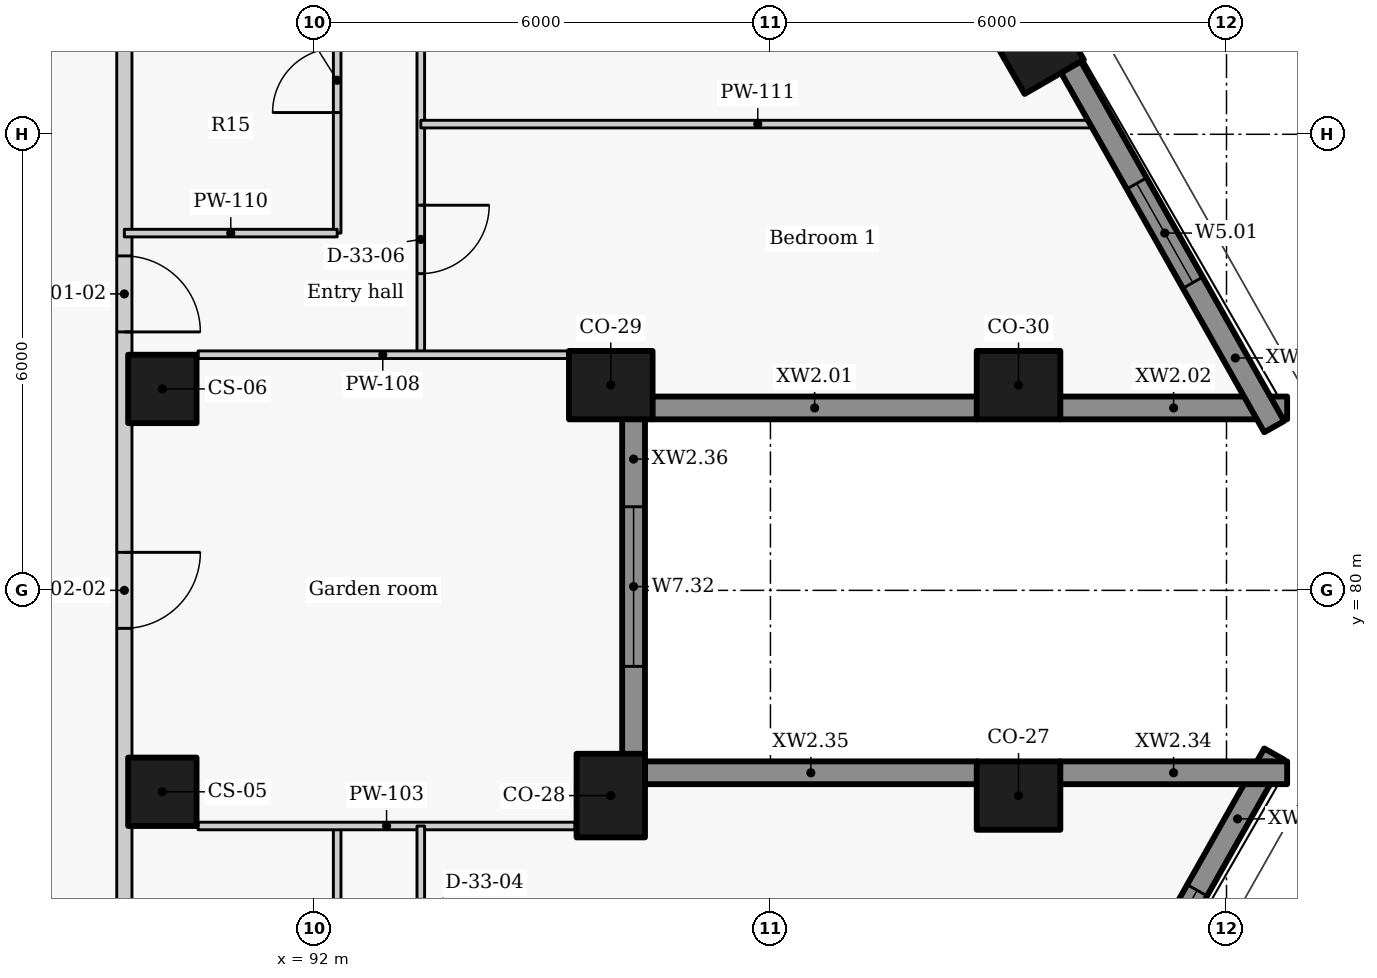
"""IFC4 building model, lengths in metres.
Left out: names, types, materials, properties, quantities, classifications, styles, units other than length and angle.
Written with IfcOpenShell. Run it as: python <this file> out.ifc"""

import sys

from ifc_helpers import new_model, si_unit, direction, frame, frame_2d, origin, origin_2d, place, context, subcontext, project, spatial, rectangle, extrude, element, fill, save


model = new_model("IFC4")
c1 = context("Model", 3, precision=1e-05, world=origin(), true_north=direction((0.0, 1.0)))
c2 = subcontext(c1, "Body", "Model", "MODEL_VIEW")
j1 = project(units=[si_unit("LENGTHUNIT", "METRE"), si_unit("PLANEANGLEUNIT", "RADIAN")], contexts=[c1])
p1 = place(None, origin())
s1 = spatial("IfcSite", under=j1, at=p1, CompositionType="ELEMENT")
p2 = place(p1, origin())
s2 = spatial("IfcBuilding", under=s1, at=p2, CompositionType="ELEMENT")
p3 = place(p2, frame((0.0, 0.0, 226.2)))
s3 = spatial("IfcBuildingStorey", under=s2, at=p3, CompositionType="ELEMENT", Elevation=226.2)
for number, where, z_axis, x_axis in (
    (1, (101.264, 77.3, 0.0), (0.0, 0.0, 1.0), (-1.0, 0.0, 0.0)),
    (2, (95.899, 77.3, 0.0), (0.0, 0.0, 1.0), (0.0, 1.0, 0.0)),
    (3, (95.899, 82.7, 0.0), (0.0, 0.0, 1.0), (1.0, 0.0, 0.0)),
    (4, (101.264, 82.7, 0.0), (0.0, 0.0, 1.0), (1.0, 0.0, 0.0)),
    (5, (101.459, 87.232, 0.0), (0.0, 0.0, 1.0), (-0.5, 0.866, 0.0)),
):
    element("IfcColumn", number, at=place(p3, frame(where, z_axis=z_axis, x_axis=x_axis)), inside=s3, PredefinedType="COLUMN", context=c2, shape_type="SweptSolid", body=[
        extrude(rectangle(XDim=1.1, YDim=0.9, at=origin_2d()), origin(), (0.0, 0.0, 1.0), 3.3),
    ])
for number, where, z_axis, x_axis in (
    (6, (90.0, 77.35, 0.0), (0.0, 0.0, 1.0), (0.0, 1.0, 0.0)),
    (7, (90.0, 82.65, 0.0), (0.0, 0.0, 1.0), (0.0, 1.0, 0.0)),
):
    element("IfcColumn", number, at=place(p3, frame(where, z_axis=z_axis, x_axis=x_axis)), inside=s3, PredefinedType="COLUMN", context=c2, shape_type="SweptSolid", body=[
        extrude(rectangle(XDim=0.9, YDim=0.9, at=origin_2d()), origin(), (0.0, 0.0, 1.0), 3.3),
    ])
p4 = place(p3, frame((96.446, 82.4, 0.0), z_axis=(0.0, 0.0, 1.0), x_axis=(1.0, 0.0, 0.0)))
e8 = element("IfcWall", 8, at=p4, inside=s3, PredefinedType="SOLIDWALL", context=c2, shape_type="SweptSolid", body=[
    extrude(rectangle(XDim=4.272, YDim=0.3, at=frame_2d((2.136, 0.0))), origin(), (0.0, 0.0, 1.0), 2.425),
])
p5 = place(p3, frame((101.81, 82.4, 0.0), z_axis=(0.0, 0.0, 1.0), x_axis=(1.0, 0.0, 0.0)))
e9 = element("IfcWall", 9, at=p5, inside=s3, PredefinedType="SOLIDWALL", context=c2, shape_type="SweptSolid", body=[
    extrude(rectangle(XDim=2.988, YDim=0.3, at=frame_2d((1.494, 0.0))), origin(), (0.0, 0.0, 1.0), 2.425),
])
p6 = place(p3, frame((104.627, 82.154, 0.0), z_axis=(0.0, 0.0, 1.0), x_axis=(-0.492080931903, 0.870549456641, 0.0)))
e10 = element("IfcWall", 10, at=p6, inside=s3, PredefinedType="SOLIDWALL", context=c2, shape_type="SweptSolid", body=[
    extrude(rectangle(XDim=5.437, YDim=0.3, at=frame_2d((2.718, 0.0))), origin(), (0.0, 0.0, 1.0), 2.425),
])
p7 = place(p6, frame((2.176, 0.0, 0.9)))
e11 = element("IfcOpeningElement", 11, at=p7, cuts=e10, PredefinedType="OPENING", context=c2, shape_type="SweptSolid", body=[
    extrude(rectangle(XDim=1.5, YDim=1.1, at=frame_2d((0.75, 0.55))), frame((0.0, 0.16, 0.0), z_axis=(0.0, -1.0, 0.0), x_axis=(1.0, 0.0, 0.0)), (0.0, 0.0, 1.0), 0.32),
])
p8 = place(p3, frame((101.952, 73.114, 0.0), z_axis=(0.0, 0.0, 1.0), x_axis=(0.492080931903, 0.870549456641, 0.0)))
e12 = element("IfcWall", 12, at=p8, inside=s3, PredefinedType="SOLIDWALL", context=c2, shape_type="SweptSolid", body=[
    extrude(rectangle(XDim=5.437, YDim=0.3, at=frame_2d((2.718, 0.0))), origin(), (0.0, 0.0, 1.0), 2.425),
])
p9 = place(p8, frame((1.878, 0.0, 0.9)))
e13 = element("IfcOpeningElement", 13, at=p9, cuts=e12, PredefinedType="OPENING", context=c2, shape_type="SweptSolid", body=[
    extrude(rectangle(XDim=1.5, YDim=1.1, at=frame_2d((0.75, 0.55))), frame((0.0, 0.16, 0.0), z_axis=(0.0, -1.0, 0.0), x_axis=(1.0, 0.0, 0.0)), (0.0, 0.0, 1.0), 0.32),
])
p10 = place(p3, frame((104.798, 77.6, 0.0), z_axis=(0.0, 0.0, 1.0), x_axis=(-1.0, 0.0, 0.0)))
e14 = element("IfcWall", 14, at=p10, inside=s3, PredefinedType="SOLIDWALL", context=c2, shape_type="SweptSolid", body=[
    extrude(rectangle(XDim=2.988, YDim=0.3, at=frame_2d((1.494, 0.0))), origin(), (0.0, 0.0, 1.0), 2.425),
])
p11 = place(p3, frame((100.718, 77.6, 0.0), z_axis=(0.0, 0.0, 1.0), x_axis=(-1.0, 0.0, 0.0)))
e15 = element("IfcWall", 15, at=p11, inside=s3, PredefinedType="SOLIDWALL", context=c2, shape_type="SweptSolid", body=[
    extrude(rectangle(XDim=4.373, YDim=0.3, at=frame_2d((2.186, 0.0))), origin(), (0.0, 0.0, 1.0), 2.425),
])
p12 = place(p3, frame((96.199, 77.846, 0.0), z_axis=(0.0, 0.0, 1.0), x_axis=(0.0, 1.0, 0.0)))
e16 = element("IfcWall", 16, at=p12, inside=s3, PredefinedType="SOLIDWALL", context=c2, shape_type="SweptSolid", body=[
    extrude(rectangle(XDim=4.408, YDim=0.3, at=frame_2d((2.204, 0.0))), origin(), (0.0, 0.0, 1.0), 2.425),
])
p13 = place(p12, frame((1.154, 0.0, 0.9)))
e17 = element("IfcOpeningElement", 17, at=p13, cuts=e16, PredefinedType="OPENING", context=c2, shape_type="SweptSolid", body=[
    extrude(rectangle(XDim=2.1, YDim=1.1, at=frame_2d((1.05, 0.55))), frame((0.0, 0.16, 0.0), z_axis=(0.0, -1.0, 0.0), x_axis=(1.0, 0.0, 0.0)), (0.0, 0.0, 1.0), 0.32),
])
p14 = place(p3, frame((89.5, 87.423, 0.0), z_axis=(0.0, 0.0, 1.0), x_axis=(0.0, -1.0, 0.0)))
e18 = element("IfcWall", 18, at=p14, inside=s3, PredefinedType="PARTITIONING", context=c2, shape_type="SweptSolid", body=[
    extrude(rectangle(XDim=15.786, YDim=0.2, at=frame_2d((7.893, 0.0))), origin(), (0.0, 0.0, 1.0), 3.025),
])
p15 = place(p14, frame((6.923, 0.0, 0.0)))
e19 = element("IfcOpeningElement", 19, at=p15, cuts=e18, PredefinedType="OPENING", context=c2, shape_type="SweptSolid", body=[
    extrude(rectangle(XDim=1.0, YDim=2.1, at=frame_2d((0.5, 1.05))), frame((0.0, 0.11, 0.0), z_axis=(0.0, -1.0, 0.0), x_axis=(1.0, 0.0, 0.0)), (0.0, 0.0, 1.0), 0.22),
])
p16 = place(p14, frame((3.023, 0.0, 0.0)))
e20 = element("IfcOpeningElement", 20, at=p16, cuts=e18, PredefinedType="OPENING", context=c2, shape_type="SweptSolid", body=[
    extrude(rectangle(XDim=1.0, YDim=2.1, at=frame_2d((0.5, 1.05))), frame((0.0, 0.11, 0.0), z_axis=(0.0, -1.0, 0.0), x_axis=(1.0, 0.0, 0.0)), (0.0, 0.0, 1.0), 0.22),
])
p17 = place(p3, frame((92.3, 69.75, 0.0), z_axis=(0.0, 0.0, 1.0), x_axis=(0.0, 1.0, 0.0)))
e21 = element("IfcWall", 21, at=p17, inside=s3, PredefinedType="PARTITIONING", context=c2, shape_type="SweptSolid", body=[
    extrude(rectangle(XDim=7.15, YDim=0.1, at=frame_2d((3.575, 0.0))), origin(), (0.0, 0.0, 1.0), 3.025),
])
p18 = place(p17, frame((1.2, 0.0, 0.0)))
e22 = element("IfcOpeningElement", 22, at=p18, cuts=e21, PredefinedType="OPENING", context=c2, shape_type="SweptSolid", body=[
    extrude(rectangle(XDim=0.85, YDim=2.1, at=frame_2d((0.425, 1.05))), frame((0.0, 0.06, 0.0), z_axis=(0.0, -1.0, 0.0), x_axis=(1.0, 0.0, 0.0)), (0.0, 0.0, 1.0), 0.12),
])
p19 = place(p17, frame((4.75, 0.0, 0.0)))
e23 = element("IfcOpeningElement", 23, at=p19, cuts=e21, PredefinedType="OPENING", context=c2, shape_type="SweptSolid", body=[
    extrude(rectangle(XDim=0.9, YDim=2.1, at=frame_2d((0.45, 1.05))), frame((0.0, 0.06, 0.0), z_axis=(0.0, -1.0, 0.0), x_axis=(1.0, 0.0, 0.0)), (0.0, 0.0, 1.0), 0.12),
])
p20 = place(p3, frame((92.3, 84.7, 0.0), z_axis=(0.0, 0.0, 1.0), x_axis=(0.0, 1.0, 0.0)))
e24 = element("IfcWall", 24, at=p20, inside=s3, PredefinedType="PARTITIONING", context=c2, shape_type="SweptSolid", body=[
    extrude(rectangle(XDim=8.85, YDim=0.1, at=frame_2d((4.425, 0.0))), origin(), (0.0, 0.0, 1.0), 3.025),
])
p21 = place(p20, frame((1.586, 0.0, 0.0)))
e25 = element("IfcOpeningElement", 25, at=p21, cuts=e24, PredefinedType="OPENING", context=c2, shape_type="SweptSolid", body=[
    extrude(rectangle(XDim=0.85, YDim=2.1, at=frame_2d((0.425, 1.05))), frame((0.0, 0.06, 0.0), z_axis=(0.0, -1.0, 0.0), x_axis=(1.0, 0.0, 0.0)), (0.0, 0.0, 1.0), 0.12),
])
p22 = place(p20, frame((5.986, 0.0, 0.0)))
e26 = element("IfcOpeningElement", 26, at=p22, cuts=e24, PredefinedType="OPENING", context=c2, shape_type="SweptSolid", body=[
    extrude(rectangle(XDim=0.9, YDim=2.1, at=frame_2d((0.45, 1.05))), frame((0.0, 0.06, 0.0), z_axis=(0.0, -1.0, 0.0), x_axis=(1.0, 0.0, 0.0)), (0.0, 0.0, 1.0), 0.12),
])
p23 = place(p3, frame((90.47, 76.9, 0.0), z_axis=(0.0, 0.0, 1.0), x_axis=(1.0, 0.0, 0.0)))
e27 = element("IfcWall", 27, at=p23, inside=s3, PredefinedType="PARTITIONING", context=c2, shape_type="SweptSolid", body=[
    extrude(rectangle(XDim=4.959, YDim=0.1, at=frame_2d((2.48, 0.0))), origin(), (0.0, 0.0, 1.0), 3.025),
])
p24 = place(p3, frame((93.4, 76.9, 0.0), z_axis=(0.0, 0.0, 1.0), x_axis=(0.0, -1.0, 0.0)))
e28 = element("IfcWall", 28, at=p24, inside=s3, PredefinedType="PARTITIONING", context=c2, shape_type="SweptSolid", body=[
    extrude(rectangle(XDim=9.75, YDim=0.1, at=frame_2d((4.875, 0.0))), origin(), (0.0, 0.0, 1.0), 3.025),
])
p25 = place(p24, frame((7.885, 0.0, 0.0)))
e29 = element("IfcOpeningElement", 29, at=p25, cuts=e28, PredefinedType="OPENING", context=c2, shape_type="SweptSolid", body=[
    extrude(rectangle(XDim=0.9, YDim=2.1, at=frame_2d((0.45, 1.05))), frame((0.0, 0.06, 0.0), z_axis=(0.0, -1.0, 0.0), x_axis=(1.0, 0.0, 0.0)), (0.0, 0.0, 1.0), 0.12),
])
p26 = place(p24, frame((4.425, 0.0, 0.0)))
e30 = element("IfcOpeningElement", 30, at=p26, cuts=e28, PredefinedType="OPENING", context=c2, shape_type="SweptSolid", body=[
    extrude(rectangle(XDim=0.9, YDim=2.1, at=frame_2d((0.45, 1.05))), frame((0.0, 0.06, 0.0), z_axis=(0.0, -1.0, 0.0), x_axis=(1.0, 0.0, 0.0)), (0.0, 0.0, 1.0), 0.12),
])
p27 = place(p24, frame((0.965, 0.0, 0.0)))
e31 = element("IfcOpeningElement", 31, at=p27, cuts=e28, PredefinedType="OPENING", context=c2, shape_type="SweptSolid", body=[
    extrude(rectangle(XDim=0.9, YDim=2.1, at=frame_2d((0.45, 1.05))), frame((0.0, 0.06, 0.0), z_axis=(0.0, -1.0, 0.0), x_axis=(1.0, 0.0, 0.0)), (0.0, 0.0, 1.0), 0.12),
])
p28 = place(p3, frame((93.4, 93.55, 0.0), z_axis=(0.0, 0.0, 1.0), x_axis=(0.0, -1.0, 0.0)))
e32 = element("IfcWall", 32, at=p28, inside=s3, PredefinedType="PARTITIONING", context=c2, shape_type="SweptSolid", body=[
    extrude(rectangle(XDim=10.45, YDim=0.1, at=frame_2d((5.225, 0.0))), origin(), (0.0, 0.0, 1.0), 3.025),
])
p29 = place(p28, frame((8.483, 0.0, 0.0)))
e33 = element("IfcOpeningElement", 33, at=p29, cuts=e32, PredefinedType="OPENING", context=c2, shape_type="SweptSolid", body=[
    extrude(rectangle(XDim=0.9, YDim=2.1, at=frame_2d((0.45, 1.05))), frame((0.0, 0.06, 0.0), z_axis=(0.0, -1.0, 0.0), x_axis=(1.0, 0.0, 0.0)), (0.0, 0.0, 1.0), 0.12),
])
p30 = place(p28, frame((4.775, 0.0, 0.0)))
e34 = element("IfcOpeningElement", 34, at=p30, cuts=e32, PredefinedType="OPENING", context=c2, shape_type="SweptSolid", body=[
    extrude(rectangle(XDim=0.9, YDim=2.1, at=frame_2d((0.45, 1.05))), frame((0.0, 0.06, 0.0), z_axis=(0.0, -1.0, 0.0), x_axis=(1.0, 0.0, 0.0)), (0.0, 0.0, 1.0), 0.12),
])
p31 = place(p28, frame((1.067, 0.0, 0.0)))
e35 = element("IfcOpeningElement", 35, at=p31, cuts=e32, PredefinedType="OPENING", context=c2, shape_type="SweptSolid", body=[
    extrude(rectangle(XDim=0.9, YDim=2.1, at=frame_2d((0.45, 1.05))), frame((0.0, 0.06, 0.0), z_axis=(0.0, -1.0, 0.0), x_axis=(1.0, 0.0, 0.0)), (0.0, 0.0, 1.0), 0.12),
])
p32 = place(p3, frame((90.47, 83.1, 0.0), z_axis=(0.0, 0.0, 1.0), x_axis=(1.0, 0.0, 0.0)))
e36 = element("IfcWall", 36, at=p32, inside=s3, PredefinedType="PARTITIONING", context=c2, shape_type="SweptSolid", body=[
    extrude(rectangle(XDim=4.86, YDim=0.1, at=frame_2d((2.43, 0.0))), origin(), (0.0, 0.0, 1.0), 3.025),
])
p33 = place(p3, frame((89.5, 84.7, 0.0), z_axis=(0.0, 0.0, 1.0), x_axis=(1.0, 0.0, 0.0)))
e37 = element("IfcWall", 37, at=p33, inside=s3, PredefinedType="PARTITIONING", context=c2, shape_type="SweptSolid", body=[
    extrude(rectangle(XDim=2.8, YDim=0.1, at=frame_2d((1.4, 0.0))), origin(), (0.0, 0.0, 1.0), 2.505),
])
p34 = place(p3, frame((93.4, 86.134, 0.0), z_axis=(0.0, 0.0, 1.0), x_axis=(1.0, 0.0, 0.0)))
e38 = element("IfcWall", 38, at=p34, inside=s3, PredefinedType="PARTITIONING", context=c2, shape_type="SweptSolid", body=[
    extrude(rectangle(XDim=8.866, YDim=0.1, at=frame_2d((4.433, 0.0))), origin(), (0.0, 0.0, 1.0), 2.405),
])
p35 = place(p7, origin())
e39 = element("IfcWindow", 39, at=p35, inside=s3, PartitioningType="SINGLE_PANEL", PredefinedType="WINDOW", context=c2, shape_type="SweptSolid", body=[
    extrude(rectangle(XDim=1.5, YDim=1.1, at=frame_2d((0.75, 0.55))), frame((0.0, 0.03, 0.0), z_axis=(0.0, -1.0, 0.0), x_axis=(1.0, 0.0, 0.0)), (0.0, 0.0, 1.0), 0.06),
])
fill(e11, e39)
p36 = place(p9, origin())
e40 = element("IfcWindow", 40, at=p36, inside=s3, PartitioningType="SINGLE_PANEL", PredefinedType="WINDOW", context=c2, shape_type="SweptSolid", body=[
    extrude(rectangle(XDim=1.5, YDim=1.1, at=frame_2d((0.75, 0.55))), frame((0.0, 0.03, 0.0), z_axis=(0.0, -1.0, 0.0), x_axis=(1.0, 0.0, 0.0)), (0.0, 0.0, 1.0), 0.06),
])
fill(e13, e40)
p37 = place(p13, origin())
e41 = element("IfcWindow", 41, at=p37, inside=s3, PartitioningType="SINGLE_PANEL", PredefinedType="WINDOW", context=c2, shape_type="SweptSolid", body=[
    extrude(rectangle(XDim=2.1, YDim=1.1, at=frame_2d((1.05, 0.55))), frame((0.0, 0.03, 0.0), z_axis=(0.0, -1.0, 0.0), x_axis=(1.0, 0.0, 0.0)), (0.0, 0.0, 1.0), 0.06),
])
fill(e17, e41)
p38 = place(p15, origin())
e42 = element("IfcDoor", 42, at=p38, inside=s3, OperationType="SINGLE_SWING_LEFT", PredefinedType="DOOR", context=c2, shape_type="SweptSolid", body=[
    extrude(rectangle(XDim=1.0, YDim=2.1, at=frame_2d((0.5, 1.05))), frame((0.0, 0.025, 0.0), z_axis=(0.0, -1.0, 0.0), x_axis=(1.0, 0.0, 0.0)), (0.0, 0.0, 1.0), 0.05),
])
fill(e19, e42)
p39 = place(p16, origin())
e43 = element("IfcDoor", 43, at=p39, inside=s3, OperationType="SINGLE_SWING_RIGHT", PredefinedType="DOOR", context=c2, shape_type="SweptSolid", body=[
    extrude(rectangle(XDim=1.0, YDim=2.1, at=frame_2d((0.5, 1.05))), frame((0.0, 0.025, 0.0), z_axis=(0.0, -1.0, 0.0), x_axis=(1.0, 0.0, 0.0)), (0.0, 0.0, 1.0), 0.05),
])
fill(e20, e43)
p40 = place(p21, origin())
e44 = element("IfcDoor", 44, at=p40, inside=s3, OperationType="SINGLE_SWING_LEFT", PredefinedType="DOOR", context=c2, shape_type="SweptSolid", body=[
    extrude(rectangle(XDim=0.85, YDim=2.1, at=frame_2d((0.425, 1.05))), frame((0.0, 0.025, 0.0), z_axis=(0.0, -1.0, 0.0), x_axis=(1.0, 0.0, 0.0)), (0.0, 0.0, 1.0), 0.05),
])
fill(e25, e44)
p41 = place(p29, origin())
e45 = element("IfcDoor", 45, at=p41, inside=s3, OperationType="SINGLE_SWING_LEFT", PredefinedType="DOOR", context=c2, shape_type="SweptSolid", body=[
    extrude(rectangle(XDim=0.9, YDim=2.1, at=frame_2d((0.45, 1.05))), frame((0.0, 0.025, 0.0), z_axis=(0.0, -1.0, 0.0), x_axis=(1.0, 0.0, 0.0)), (0.0, 0.0, 1.0), 0.05),
])
fill(e33, e45)
save(model, sys.argv[1])
